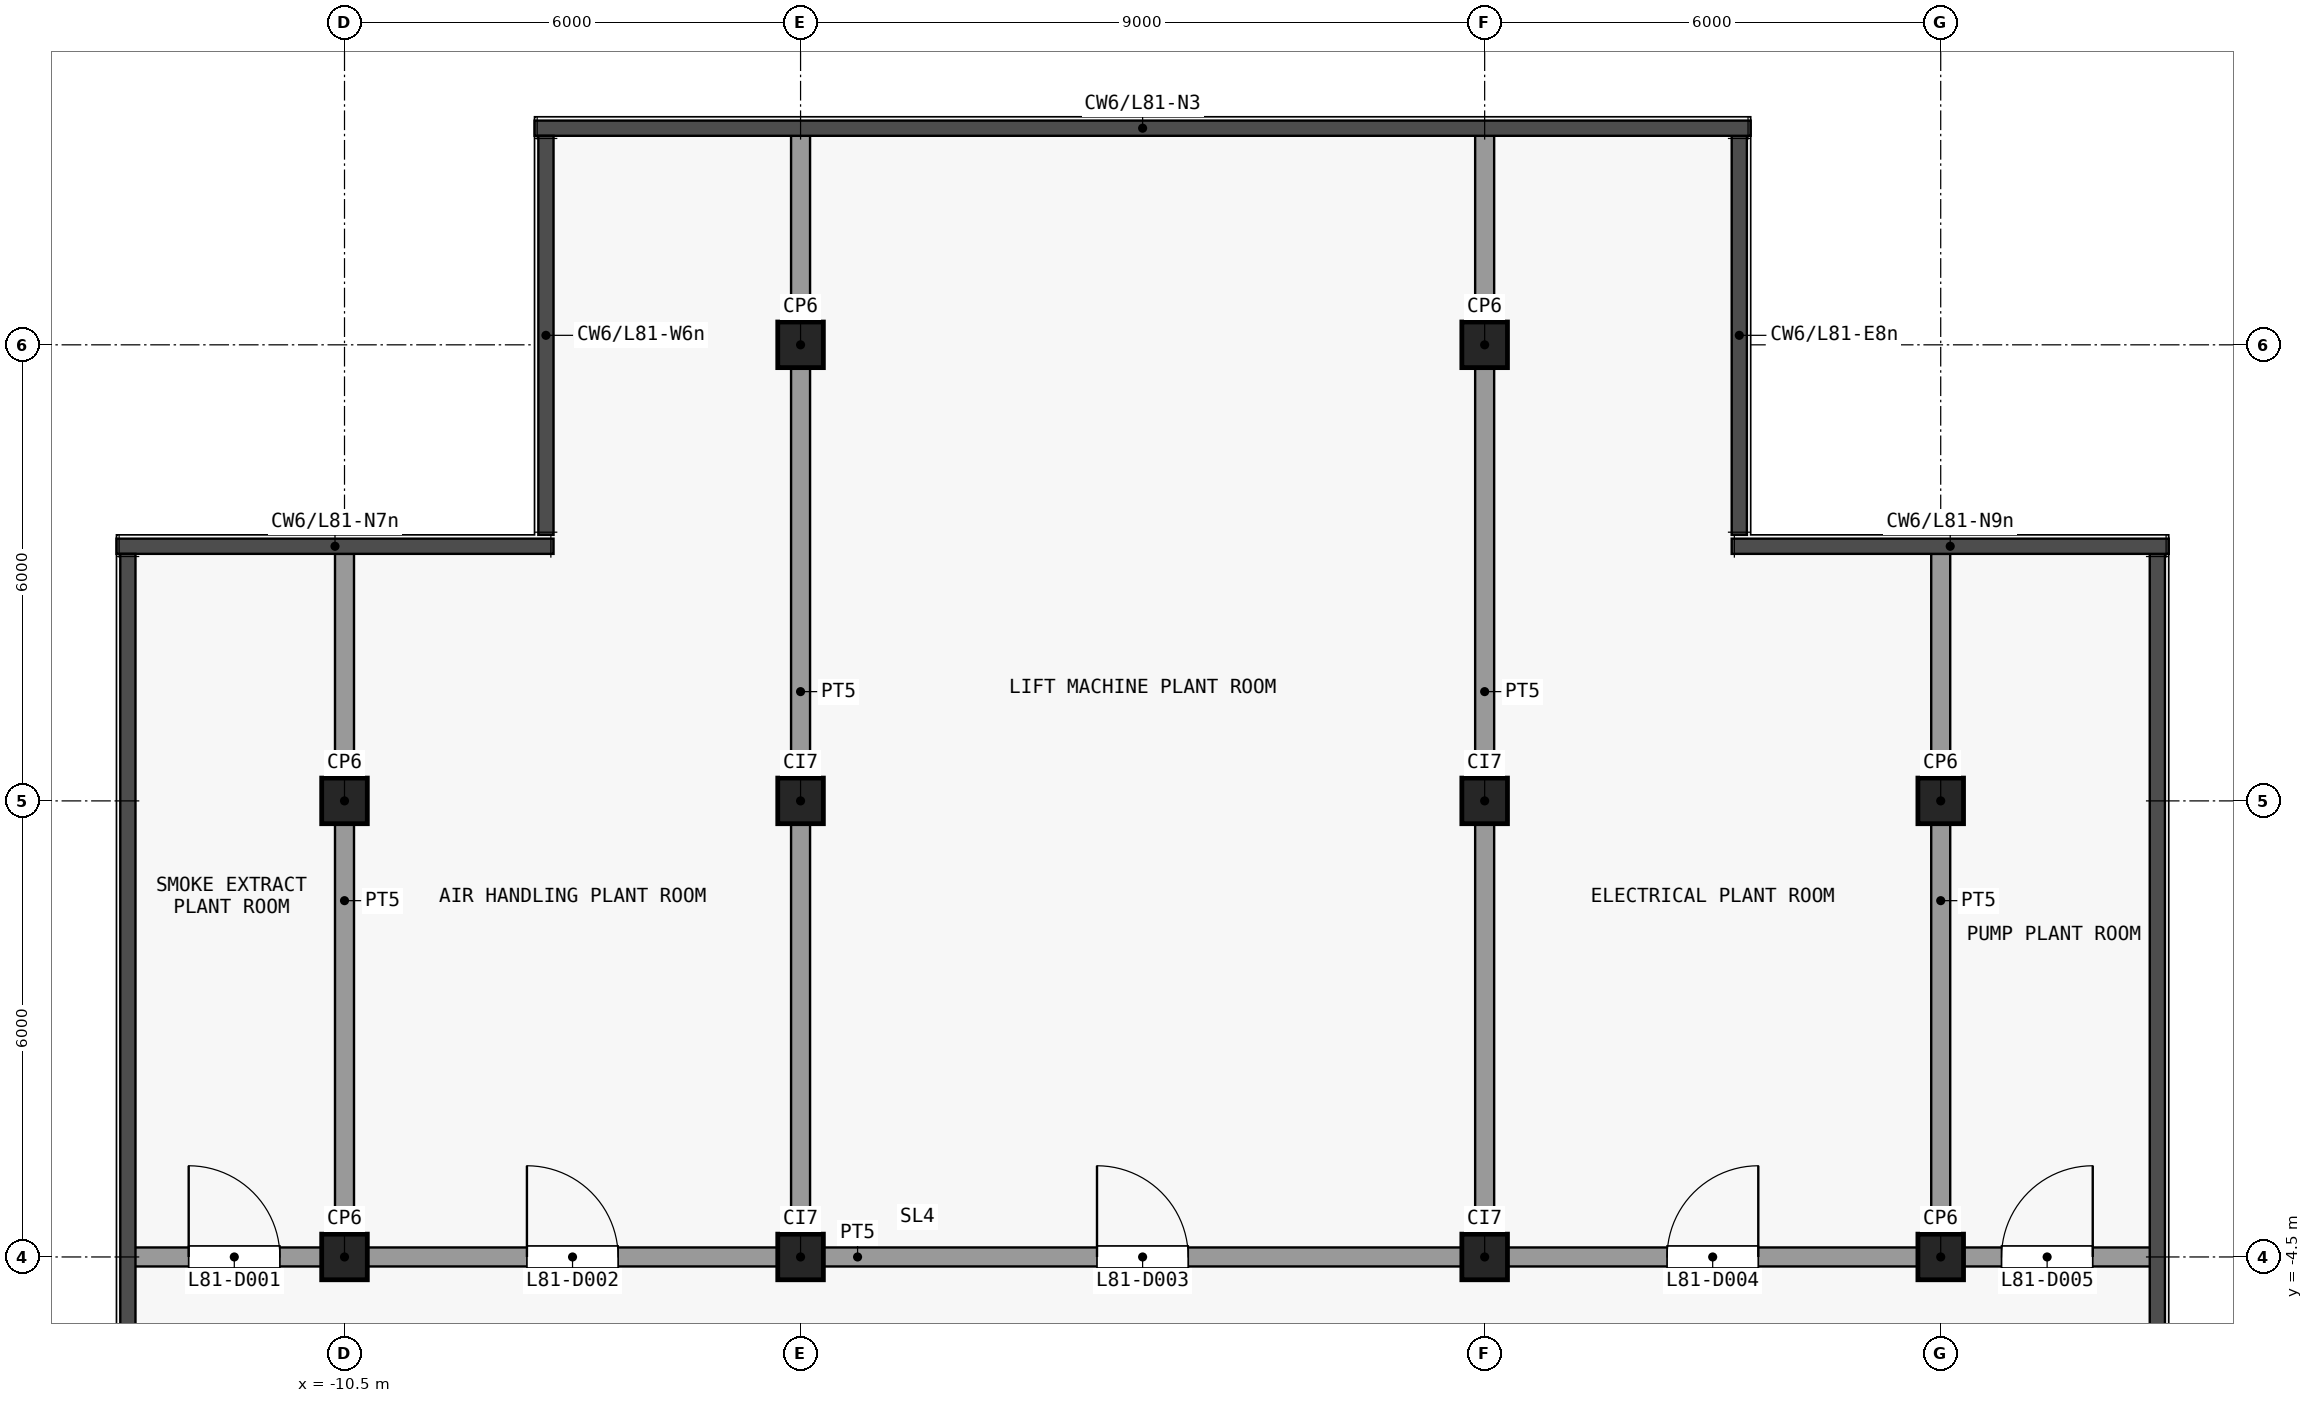
"""IFC4 building model, lengths in metres.
Left out: names, types, materials, properties, quantities, classifications, styles, units other than length and angle.
Written with IfcOpenShell. Run it as: python <this file> out.ifc"""

import sys

from ifc_helpers import new_model, si_unit, direction, frame, frame_2d, origin, origin_2d, place, context, subcontext, project, spatial, rectangle, extrude, element, fill, save


model = new_model("IFC4")
c1 = context("Model", 3, precision=1e-05, world=origin(), true_north=direction((0.0, 1.0)))
c2 = subcontext(c1, "Body", "Model", "MODEL_VIEW")
j1 = project(units=[si_unit("LENGTHUNIT", "METRE"), si_unit("PLANEANGLEUNIT", "RADIAN")], contexts=[c1])
p1 = place(None, origin())
s1 = spatial("IfcSite", under=j1, at=p1, CompositionType="ELEMENT")
p2 = place(p1, origin())
s2 = spatial("IfcBuilding", under=s1, at=p2, CompositionType="ELEMENT")
p3 = place(p2, frame((0.0, 0.0, 321.2)))
s3 = spatial("IfcBuildingStorey", under=s2, at=p3, CompositionType="ELEMENT", Elevation=321.2)
for number, where, z_axis, x_axis in (
    (1, (-10.5, -4.5, 0.0), (0.0, 0.0, 1.0), (1.0, 0.0, 0.0)),
    (2, (-10.5, 1.5, 0.0), (0.0, 0.0, 1.0), (1.0, 0.0, 0.0)),
    (3, (-4.5, -4.5, 0.0), (0.0, 0.0, 1.0), (1.0, 0.0, 0.0)),
    (4, (-4.5, 1.5, 0.0), (0.0, 0.0, 1.0), (1.0, 0.0, 0.0)),
    (5, (-4.5, 7.5, 0.0), (0.0, 0.0, 1.0), (1.0, 0.0, 0.0)),
    (6, (4.5, -4.5, 0.0), (0.0, 0.0, 1.0), (1.0, 0.0, 0.0)),
    (7, (4.5, 1.5, 0.0), (0.0, 0.0, 1.0), (1.0, 0.0, 0.0)),
    (8, (4.5, 7.5, 0.0), (0.0, 0.0, 1.0), (1.0, 0.0, 0.0)),
    (9, (10.5, -4.5, 0.0), (0.0, 0.0, 1.0), (1.0, 0.0, 0.0)),
    (10, (10.5, 1.5, 0.0), (0.0, 0.0, 1.0), (1.0, 0.0, 0.0)),
):
    element("IfcColumn", number, at=place(p3, frame(where, z_axis=z_axis, x_axis=x_axis)), inside=s3, PredefinedType="COLUMN", context=c2, shape_type="SweptSolid", body=[
        extrude(rectangle(XDim=0.6, YDim=0.6, at=origin_2d()), origin(), (0.0, 0.0, 1.0), 4.5),
    ])
p4 = place(p3, frame((-13.35, -4.5, 0.0), z_axis=(0.0, 0.0, 1.0), x_axis=(1.0, 0.0, 0.0)))
e11 = element("IfcWall", 11, at=p4, inside=s3, PredefinedType="PARTITIONING", context=c2, shape_type="SweptSolid", body=[
    extrude(rectangle(XDim=26.7, YDim=0.25, at=frame_2d((13.35, 0.0))), origin(), (0.0, 0.0, 1.0), 4.05),
])
p5 = place(p4, frame((0.8, 0.0, 0.0)))
e12 = element("IfcOpeningElement", 12, at=p5, cuts=e11, PredefinedType="OPENING", context=c2, shape_type="SweptSolid", body=[
    extrude(rectangle(XDim=1.2, YDim=2.1, at=frame_2d((0.6, 1.05))), frame((0.0, 0.135, 0.0), z_axis=(0.0, -1.0, 0.0), x_axis=(1.0, 0.0, 0.0)), (0.0, 0.0, 1.0), 0.27),
])
p6 = place(p4, frame((5.25, 0.0, 0.0)))
e13 = element("IfcOpeningElement", 13, at=p6, cuts=e11, PredefinedType="OPENING", context=c2, shape_type="SweptSolid", body=[
    extrude(rectangle(XDim=1.2, YDim=2.1, at=frame_2d((0.6, 1.05))), frame((0.0, 0.135, 0.0), z_axis=(0.0, -1.0, 0.0), x_axis=(1.0, 0.0, 0.0)), (0.0, 0.0, 1.0), 0.27),
])
p7 = place(p4, frame((12.75, 0.0, 0.0)))
e14 = element("IfcOpeningElement", 14, at=p7, cuts=e11, PredefinedType="OPENING", context=c2, shape_type="SweptSolid", body=[
    extrude(rectangle(XDim=1.2, YDim=2.1, at=frame_2d((0.6, 1.05))), frame((0.0, 0.135, 0.0), z_axis=(0.0, -1.0, 0.0), x_axis=(1.0, 0.0, 0.0)), (0.0, 0.0, 1.0), 0.27),
])
p8 = place(p4, frame((20.25, 0.0, 0.0)))
e15 = element("IfcOpeningElement", 15, at=p8, cuts=e11, PredefinedType="OPENING", context=c2, shape_type="SweptSolid", body=[
    extrude(rectangle(XDim=1.2, YDim=2.1, at=frame_2d((0.6, 1.05))), frame((0.0, 0.135, 0.0), z_axis=(0.0, -1.0, 0.0), x_axis=(1.0, 0.0, 0.0)), (0.0, 0.0, 1.0), 0.27),
])
p9 = place(p4, frame((24.65, 0.0, 0.0)))
e16 = element("IfcOpeningElement", 16, at=p9, cuts=e11, PredefinedType="OPENING", context=c2, shape_type="SweptSolid", body=[
    extrude(rectangle(XDim=1.2, YDim=2.1, at=frame_2d((0.6, 1.05))), frame((0.0, 0.135, 0.0), z_axis=(0.0, -1.0, 0.0), x_axis=(1.0, 0.0, 0.0)), (0.0, 0.0, 1.0), 0.27),
])
p10 = place(p3, frame((-10.5, -4.375, 0.0), z_axis=(0.0, 0.0, 1.0), x_axis=(0.0, 1.0, 0.0)))
e17 = element("IfcWall", 17, at=p10, inside=s3, PredefinedType="PARTITIONING", context=c2, shape_type="SweptSolid", body=[
    extrude(rectangle(XDim=9.125, YDim=0.25, at=frame_2d((4.562, 0.0))), origin(), (0.0, 0.0, 1.0), 4.05),
])
for number, where, z_axis, x_axis in (
    (18, (-4.5, -4.375, 0.0), (0.0, 0.0, 1.0), (0.0, 1.0, 0.0)),
    (19, (4.5, -4.375, 0.0), (0.0, 0.0, 1.0), (0.0, 1.0, 0.0)),
):
    element("IfcWall", number, at=place(p3, frame(where, z_axis=z_axis, x_axis=x_axis)), inside=s3, PredefinedType="PARTITIONING", context=c2, shape_type="SweptSolid", body=[
        extrude(rectangle(XDim=14.625, YDim=0.25, at=frame_2d((7.312, 0.0))), origin(), (0.0, 0.0, 1.0), 4.05),
    ])
p11 = place(p3, frame((10.5, -4.375, 0.0), z_axis=(0.0, 0.0, 1.0), x_axis=(0.0, 1.0, 0.0)))
e20 = element("IfcWall", 20, at=p11, inside=s3, PredefinedType="PARTITIONING", context=c2, shape_type="SweptSolid", body=[
    extrude(rectangle(XDim=9.125, YDim=0.25, at=frame_2d((4.562, 0.0))), origin(), (0.0, 0.0, 1.0), 4.05),
])
p12 = place(p5, origin())
e21 = element("IfcDoor", 21, at=p12, inside=s3, OperationType="SINGLE_SWING_RIGHT", PredefinedType="DOOR", context=c2, shape_type="SweptSolid", body=[
    extrude(rectangle(XDim=1.2, YDim=2.1, at=frame_2d((0.6, 1.05))), frame((0.0, 0.025, 0.0), z_axis=(0.0, -1.0, 0.0), x_axis=(1.0, 0.0, 0.0)), (0.0, 0.0, 1.0), 0.05),
])
fill(e12, e21)
p13 = place(p6, origin())
e22 = element("IfcDoor", 22, at=p13, inside=s3, OperationType="SINGLE_SWING_RIGHT", PredefinedType="DOOR", context=c2, shape_type="SweptSolid", body=[
    extrude(rectangle(XDim=1.2, YDim=2.1, at=frame_2d((0.6, 1.05))), frame((0.0, 0.025, 0.0), z_axis=(0.0, -1.0, 0.0), x_axis=(1.0, 0.0, 0.0)), (0.0, 0.0, 1.0), 0.05),
])
fill(e13, e22)
p14 = place(p7, origin())
e23 = element("IfcDoor", 23, at=p14, inside=s3, OperationType="SINGLE_SWING_RIGHT", PredefinedType="DOOR", context=c2, shape_type="SweptSolid", body=[
    extrude(rectangle(XDim=1.2, YDim=2.1, at=frame_2d((0.6, 1.05))), frame((0.0, 0.025, 0.0), z_axis=(0.0, -1.0, 0.0), x_axis=(1.0, 0.0, 0.0)), (0.0, 0.0, 1.0), 0.05),
])
fill(e14, e23)
p15 = place(p8, origin())
e24 = element("IfcDoor", 24, at=p15, inside=s3, OperationType="SINGLE_SWING_LEFT", PredefinedType="DOOR", context=c2, shape_type="SweptSolid", body=[
    extrude(rectangle(XDim=1.2, YDim=2.1, at=frame_2d((0.6, 1.05))), frame((0.0, 0.025, 0.0), z_axis=(0.0, -1.0, 0.0), x_axis=(1.0, 0.0, 0.0)), (0.0, 0.0, 1.0), 0.05),
])
fill(e15, e24)
p16 = place(p9, origin())
e25 = element("IfcDoor", 25, at=p16, inside=s3, OperationType="SINGLE_SWING_LEFT", PredefinedType="DOOR", context=c2, shape_type="SweptSolid", body=[
    extrude(rectangle(XDim=1.2, YDim=2.1, at=frame_2d((0.6, 1.05))), frame((0.0, 0.025, 0.0), z_axis=(0.0, -1.0, 0.0), x_axis=(1.0, 0.0, 0.0)), (0.0, 0.0, 1.0), 0.05),
])
fill(e16, e25)
save(model, sys.argv[1])
